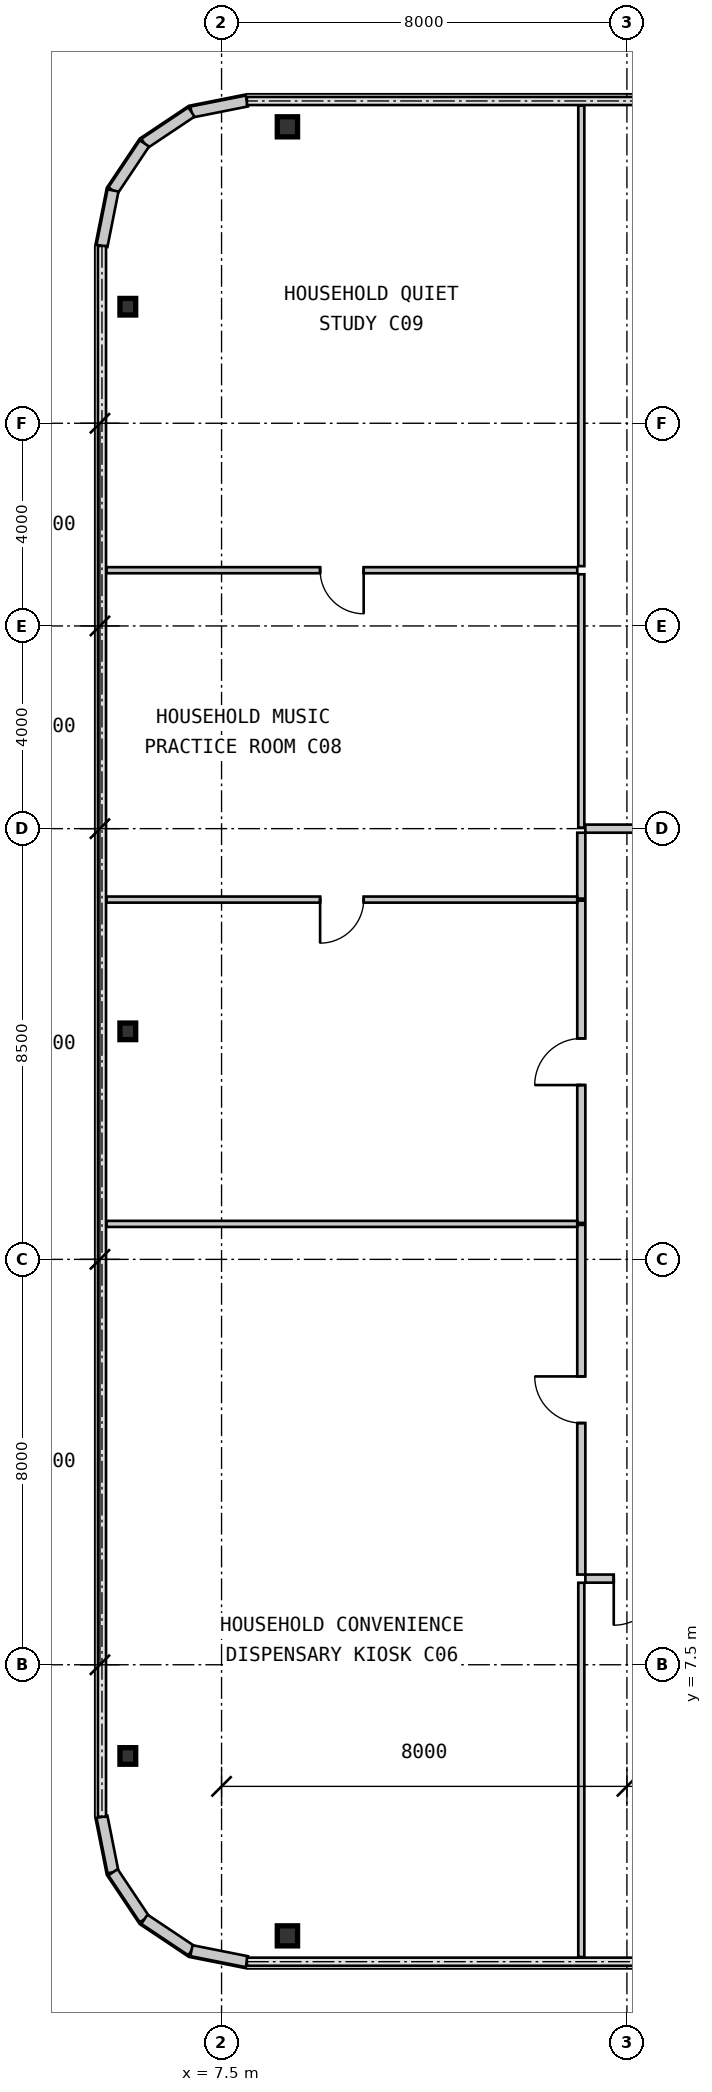
"""IFC4 building model, lengths in metres.
Left out: names, types, materials, properties, quantities, classifications, styles, units other than length and angle.
Written with IfcOpenShell. Run it as: python <this file> out.ifc"""

import sys

from ifc_helpers import new_model, si_unit, direction, frame, frame_2d, origin, origin_2d, place, context, subcontext, project, spatial, rectangle, i_section, extrude, source, transform, mapped, element, fill, save


model = new_model("IFC4")
c1 = context("Model", 3, precision=1e-05, world=origin(), true_north=direction((0.0, 1.0)))
c2 = subcontext(c1, "Body", "Model", "MODEL_VIEW")
j1 = project(units=[si_unit("LENGTHUNIT", "METRE"), si_unit("PLANEANGLEUNIT", "RADIAN")], contexts=[c1])
p1 = place(None, origin())
s1 = spatial("IfcSite", under=j1, at=p1, CompositionType="ELEMENT")
p2 = place(p1, origin())
s2 = spatial("IfcBuilding", under=s1, at=p2, CompositionType="ELEMENT")
p3 = place(p2, frame((0.0, 0.0, 45.15)))
s3 = spatial("IfcBuildingStorey", under=s2, at=p3, CompositionType="ELEMENT", Elevation=45.15)
m1 = source(origin(), c2, "Body", "SweptSolid", [
    extrude(i_section(OverallWidth=0.4, OverallDepth=0.396, WebThickness=0.022, FlangeThickness=0.034, at=origin_2d()), origin(), (0.0, 0.0, 1.0), 3.15),
])
for number, where, z_axis, x_axis in (
    (1, (8.8, 2.15, 0.0), (0.0, 0.0, 1.0), (1.0, 0.0, 0.0)),
    (2, (8.8, 37.85, 0.0), (0.0, 0.0, 1.0), (1.0, 0.0, 0.0)),
):
    element("IfcColumn", number, at=place(p3, frame(where, z_axis=z_axis, x_axis=x_axis)), inside=s3, PredefinedType="COLUMN", context=c2, shape_type="MappedRepresentation", body=[
        mapped(m1, transform((0.0, 0.0, 0.0), scale=1.0)),
    ])
m2 = source(origin(), c2, "Body", "SweptSolid", [
    extrude(i_section(OverallWidth=0.311, OverallDepth=0.327, WebThickness=0.016, FlangeThickness=0.025, at=origin_2d()), origin(), (0.0, 0.0, 1.0), 3.15),
])
for number, where, z_axis, x_axis in (
    (3, (5.65, 5.7, 0.0), (0.0, 0.0, 1.0), (1.0, 0.0, 0.0)),
    (4, (5.65, 20.0, 0.0), (0.0, 0.0, 1.0), (1.0, 0.0, 0.0)),
    (5, (5.65, 34.3, 0.0), (0.0, 0.0, 1.0), (1.0, 0.0, 0.0)),
):
    element("IfcColumn", number, at=place(p3, frame(where, z_axis=z_axis, x_axis=x_axis)), inside=s3, PredefinedType="COLUMN", context=c2, shape_type="MappedRepresentation", body=[
        mapped(m2, transform((0.0, 0.0, 0.0), scale=1.0)),
    ])
m3 = source(origin(), c2, "Body", "SweptSolid", [
    extrude(rectangle(XDim=1.116, YDim=0.22, at=frame_2d((0.558, 0.0))), origin(), (0.0, 0.0, 1.0), 2.93),
])
for number, where, z_axis, x_axis in (
    (6, (8.0, 38.36, 0.0), (0.0, 0.0, 1.0), (-0.981, -0.195, 0.0)),
    (7, (6.906, 38.142, 0.0), (0.0, 0.0, 1.0), (-0.831, -0.556, 0.0)),
    (8, (5.978, 37.522, 0.0), (0.0, 0.0, 1.0), (-0.556, -0.831, 0.0)),
    (9, (5.358, 36.594, 0.0), (0.0, 0.0, 1.0), (-0.195, -0.981, 0.0)),
    (10, (5.14, 4.5, 0.0), (0.0, 0.0, 1.0), (0.195, -0.981, 0.0)),
    (11, (5.358, 3.406, 0.0), (0.0, 0.0, 1.0), (0.556, -0.831, 0.0)),
    (12, (5.978, 2.478, 0.0), (0.0, 0.0, 1.0), (0.831, -0.556, 0.0)),
    (13, (6.906, 1.858, 0.0), (0.0, 0.0, 1.0), (0.981, -0.195, 0.0)),
):
    element("IfcWall", number, at=place(p3, frame(where, z_axis=z_axis, x_axis=x_axis)), inside=s3, PredefinedType="SOLIDWALL", context=c2, shape_type="MappedRepresentation", body=[
        mapped(m3, transform((0.0, 0.0, 0.0), scale=1.0)),
    ])
m4 = source(origin(), c2, "Body", "SweptSolid", [
    extrude(rectangle(XDim=2.04, YDim=0.16, at=frame_2d((1.02, 0.0))), origin(), (0.0, 0.0, 1.0), 2.93),
])
p4 = place(p3, frame((16.72, 9.2, 0.0), z_axis=(0.0, 0.0, 1.0), x_axis=(-1.0, 0.0, 0.0)))
e14 = element("IfcWall", 14, at=p4, inside=s3, PredefinedType="PARTITIONING", context=c2, shape_type="MappedRepresentation", body=[
    mapped(m4, transform((0.0, 0.0, 0.0), scale=1.0)),
])
m5 = source(origin(), c2, "Body", "SweptSolid", [
    extrude(rectangle(XDim=0.92, YDim=2.1, at=frame_2d((0.46, 1.05))), frame((0.0, 0.09, 0.0), z_axis=(0.0, -1.0, 0.0), x_axis=(1.0, 0.0, 0.0)), (0.0, 0.0, 1.0), 0.18),
])
p5 = place(p4, frame((0.56, 0.0, 0.0)))
e15 = element("IfcOpeningElement", 15, at=p5, cuts=e14, PredefinedType="OPENING", context=c2, shape_type="MappedRepresentation", body=[
    mapped(m5, transform((0.0, 0.0, 0.0), scale=1.0)),
])
m6 = source(origin(), c2, "Body", "SweptSolid", [
    extrude(rectangle(XDim=6.9, YDim=0.16, at=frame_2d((3.45, 0.0))), origin(), (0.0, 0.0, 1.0), 2.93),
])
p6 = place(p3, frame((14.6, 9.28, 0.0), z_axis=(0.0, 0.0, 1.0), x_axis=(0.0, 1.0, 0.0)))
e16 = element("IfcWall", 16, at=p6, inside=s3, PredefinedType="PARTITIONING", context=c2, shape_type="MappedRepresentation", body=[
    mapped(m6, transform((0.0, 0.0, 0.0), scale=1.0)),
])
p7 = place(p6, frame((2.99, 0.0, 0.0)))
e17 = element("IfcOpeningElement", 17, at=p7, cuts=e16, PredefinedType="OPENING", context=c2, shape_type="MappedRepresentation", body=[
    mapped(m5, transform((0.0, 0.0, 0.0), scale=1.0)),
])
m7 = source(origin(), c2, "Body", "SweptSolid", [
    extrude(rectangle(XDim=6.36, YDim=0.16, at=frame_2d((3.18, 0.0))), origin(), (0.0, 0.0, 1.0), 2.93),
])
p8 = place(p3, frame((14.6, 16.22, 0.0), z_axis=(0.0, 0.0, 1.0), x_axis=(0.0, 1.0, 0.0)))
e18 = element("IfcWall", 18, at=p8, inside=s3, PredefinedType="PARTITIONING", context=c2, shape_type="MappedRepresentation", body=[
    mapped(m7, transform((0.0, 0.0, 0.0), scale=1.0)),
])
p9 = place(p8, frame((2.72, 0.0, 0.0)))
e19 = element("IfcOpeningElement", 19, at=p9, cuts=e18, PredefinedType="OPENING", context=c2, shape_type="MappedRepresentation", body=[
    mapped(m5, transform((0.0, 0.0, 0.0), scale=1.0)),
])
m8 = source(origin(), c2, "Body", "SweptSolid", [
    extrude(rectangle(XDim=1.3, YDim=0.16, at=frame_2d((0.65, 0.0))), origin(), (0.0, 0.0, 1.0), 2.93),
])
p10 = place(p3, frame((14.6, 22.62, 0.0), z_axis=(0.0, 0.0, 1.0), x_axis=(0.0, 1.0, 0.0)))
e20 = element("IfcWall", 20, at=p10, inside=s3, PredefinedType="PARTITIONING", context=c2, shape_type="MappedRepresentation", body=[
    mapped(m8, transform((0.0, 0.0, 0.0), scale=1.0)),
])
m9 = source(origin(), c2, "Body", "SweptSolid", [
    extrude(rectangle(XDim=4.13, YDim=0.16, at=frame_2d((2.065, 0.0))), origin(), (0.0, 0.0, 1.0), 2.93),
])
p11 = place(p3, frame((14.68, 24.0, 0.0), z_axis=(0.0, 0.0, 1.0), x_axis=(1.0, 0.0, 0.0)))
e21 = element("IfcWall", 21, at=p11, inside=s3, PredefinedType="PARTITIONING", context=c2, shape_type="MappedRepresentation", body=[
    mapped(m9, transform((0.0, 0.0, 0.0), scale=1.0)),
])
p12 = place(p11, frame((1.69, 0.0, 0.0)))
e22 = element("IfcOpeningElement", 22, at=p12, cuts=e21, PredefinedType="OPENING", context=c2, shape_type="MappedRepresentation", body=[
    mapped(m5, transform((0.0, 0.0, 0.0), scale=1.0)),
])
m10 = source(origin(), c2, "Body", "SweptSolid", [
    extrude(rectangle(XDim=7.386, YDim=0.12, at=frame_2d((3.693, 0.0))), origin(), (0.0, 0.0, 1.0), 2.93),
])
p13 = place(p3, frame((14.6, 1.732, 0.0), z_axis=(0.0, 0.0, 1.0), x_axis=(0.0, 1.0, 0.0)))
e23 = element("IfcWall", 23, at=p13, inside=s3, PredefinedType="PARTITIONING", context=c2, shape_type="MappedRepresentation", body=[
    mapped(m10, transform((0.0, 0.0, 0.0), scale=1.0)),
])
m11 = source(origin(), c2, "Body", "SweptSolid", [
    extrude(rectangle(XDim=9.29, YDim=0.12, at=frame_2d((4.645, 0.0))), origin(), (0.0, 0.0, 1.0), 2.93),
])
p14 = place(p3, frame((5.23, 16.2, 0.0), z_axis=(0.0, 0.0, 1.0), x_axis=(1.0, 0.0, 0.0)))
e24 = element("IfcWall", 24, at=p14, inside=s3, PredefinedType="PARTITIONING", context=c2, shape_type="MappedRepresentation", body=[
    mapped(m11, transform((0.0, 0.0, 0.0), scale=1.0)),
])
p15 = place(p3, frame((5.23, 22.6, 0.0), z_axis=(0.0, 0.0, 1.0), x_axis=(1.0, 0.0, 0.0)))
e25 = element("IfcWall", 25, at=p15, inside=s3, PredefinedType="PARTITIONING", context=c2, shape_type="MappedRepresentation", body=[
    mapped(m11, transform((0.0, 0.0, 0.0), scale=1.0)),
])
m12 = source(origin(), c2, "Body", "SweptSolid", [
    extrude(rectangle(XDim=0.86, YDim=2.1, at=frame_2d((0.43, 1.05))), frame((0.0, 0.07, 0.0), z_axis=(0.0, -1.0, 0.0), x_axis=(1.0, 0.0, 0.0)), (0.0, 0.0, 1.0), 0.14),
])
p16 = place(p15, frame((4.215, 0.0, 0.0)))
e26 = element("IfcOpeningElement", 26, at=p16, cuts=e25, PredefinedType="OPENING", context=c2, shape_type="MappedRepresentation", body=[
    mapped(m12, transform((0.0, 0.0, 0.0), scale=1.0)),
])
p17 = place(p3, frame((5.23, 29.1, 0.0), z_axis=(0.0, 0.0, 1.0), x_axis=(1.0, 0.0, 0.0)))
e27 = element("IfcWall", 27, at=p17, inside=s3, PredefinedType="PARTITIONING", context=c2, shape_type="MappedRepresentation", body=[
    mapped(m11, transform((0.0, 0.0, 0.0), scale=1.0)),
])
p18 = place(p17, frame((4.215, 0.0, 0.0)))
e28 = element("IfcOpeningElement", 28, at=p18, cuts=e27, PredefinedType="OPENING", context=c2, shape_type="MappedRepresentation", body=[
    mapped(m12, transform((0.0, 0.0, 0.0), scale=1.0)),
])
m13 = source(origin(), c2, "Body", "SweptSolid", [
    extrude(rectangle(XDim=5.0, YDim=0.12, at=frame_2d((2.5, 0.0))), origin(), (0.0, 0.0, 1.0), 2.93),
])
p19 = place(p3, frame((14.6, 29.02, 0.0), z_axis=(0.0, 0.0, 1.0), x_axis=(0.0, -1.0, 0.0)))
e29 = element("IfcWall", 29, at=p19, inside=s3, PredefinedType="PARTITIONING", context=c2, shape_type="MappedRepresentation", body=[
    mapped(m13, transform((0.0, 0.0, 0.0), scale=1.0)),
])
m14 = source(origin(), c2, "Body", "SweptSolid", [
    extrude(rectangle(XDim=9.09, YDim=0.12, at=frame_2d((4.545, 0.0))), origin(), (0.0, 0.0, 1.0), 2.93),
])
p20 = place(p3, frame((14.6, 38.27, 0.0), z_axis=(0.0, 0.0, 1.0), x_axis=(0.0, -1.0, 0.0)))
e30 = element("IfcWall", 30, at=p20, inside=s3, PredefinedType="PARTITIONING", context=c2, shape_type="MappedRepresentation", body=[
    mapped(m14, transform((0.0, 0.0, 0.0), scale=1.0)),
])
m15 = source(origin(), c2, "Body", "SweptSolid", [
    extrude(rectangle(XDim=0.92, YDim=2.1, at=frame_2d((0.46, 1.05))), frame((0.0, 0.025, 0.0), z_axis=(0.0, -1.0, 0.0), x_axis=(1.0, 0.0, 0.0)), (0.0, 0.0, 1.0), 0.05),
])
p21 = place(p5, origin())
e31 = element("IfcDoor", 31, at=p21, inside=s3, OperationType="SINGLE_SWING_RIGHT", PredefinedType="DOOR", context=c2, shape_type="MappedRepresentation", body=[
    mapped(m15, transform((0.0, 0.0, 0.0), scale=1.0)),
])
fill(e15, e31)
p22 = place(p7, origin())
e32 = element("IfcDoor", 32, at=p22, inside=s3, OperationType="SINGLE_SWING_RIGHT", PredefinedType="DOOR", context=c2, shape_type="MappedRepresentation", body=[
    mapped(m15, transform((0.0, 0.0, 0.0), scale=1.0)),
])
fill(e17, e32)
p23 = place(p9, origin())
e33 = element("IfcDoor", 33, at=p23, inside=s3, OperationType="SINGLE_SWING_LEFT", PredefinedType="DOOR", context=c2, shape_type="MappedRepresentation", body=[
    mapped(m15, transform((0.0, 0.0, 0.0), scale=1.0)),
])
fill(e19, e33)
m16 = source(origin(), c2, "Body", "SweptSolid", [
    extrude(rectangle(XDim=0.86, YDim=2.1, at=frame_2d((0.43, 1.05))), frame((0.0, 0.025, 0.0), z_axis=(0.0, -1.0, 0.0), x_axis=(1.0, 0.0, 0.0)), (0.0, 0.0, 1.0), 0.05),
])
p24 = place(p16, frame((0.86, 0.0, 0.0), z_axis=(0.0, 0.0, 1.0), x_axis=(-1.0, 0.0, 0.0)))
e34 = element("IfcDoor", 34, at=p24, inside=s3, OperationType="SINGLE_SWING_RIGHT", PredefinedType="DOOR", context=c2, shape_type="MappedRepresentation", body=[
    mapped(m16, transform((0.0, 0.0, 0.0), scale=1.0)),
])
fill(e26, e34)
p25 = place(p18, frame((0.86, 0.0, 0.0), z_axis=(0.0, 0.0, 1.0), x_axis=(-1.0, 0.0, 0.0)))
e35 = element("IfcDoor", 35, at=p25, inside=s3, OperationType="SINGLE_SWING_LEFT", PredefinedType="DOOR", context=c2, shape_type="MappedRepresentation", body=[
    mapped(m16, transform((0.0, 0.0, 0.0), scale=1.0)),
])
fill(e28, e35)
save(model, sys.argv[1])
